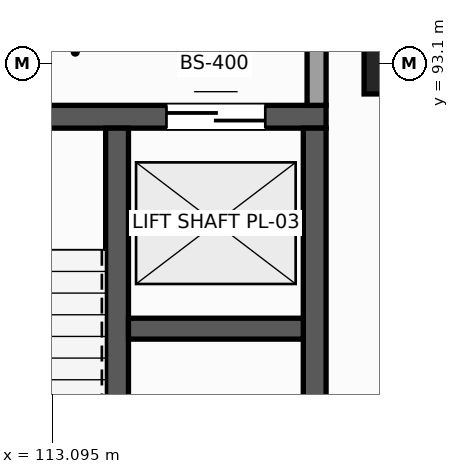
"""IFC4 building model, lengths in metres.
Left out: names, types, materials, properties, quantities, classifications, styles, units other than length and angle.
Written with IfcOpenShell. Run it as: python <this file> out.ifc"""

import sys

from ifc_helpers import new_model, si_unit, direction, frame, frame_2d, origin, origin_2d, place, context, subcontext, project, spatial, rectangle, extrude, element, fill, save


model = new_model("IFC4")
c1 = context("Model", 3, precision=1e-05, world=origin(), true_north=direction((0.0, 1.0)))
c2 = subcontext(c1, "Body", "Model", "MODEL_VIEW")
j1 = project(units=[si_unit("LENGTHUNIT", "METRE"), si_unit("PLANEANGLEUNIT", "RADIAN")], contexts=[c1])
p1 = place(None, origin())
s1 = spatial("IfcSite", under=j1, at=p1, CompositionType="ELEMENT")
p2 = place(p1, origin())
s2 = spatial("IfcBuilding", under=s1, at=p2, CompositionType="ELEMENT")
p3 = place(p2, frame((0.0, 0.0, -5.4)))
s3 = spatial("IfcBuildingStorey", under=s2, at=p3, CompositionType="ELEMENT", Elevation=-5.4)
p4 = place(p3, frame((117.6, 93.1, -0.4), z_axis=(0.0, 0.0, 1.0), x_axis=(1.0, 0.0, 0.0)))
e1 = element("IfcColumn", 1, at=p4, inside=s3, PredefinedType="COLUMN", context=c2, shape_type="SweptSolid", body=[
    extrude(rectangle(XDim=0.8, YDim=0.8, at=origin_2d()), origin(), (0.0, 0.0, 1.0), 5.8),
])
p5 = place(p3, frame((110.1, 92.4, 0.0), z_axis=(0.0, 0.0, 1.0), x_axis=(1.0, 0.0, 0.0)))
e2 = element("IfcWall", 2, at=p5, inside=s3, PredefinedType="SHEAR", context=c2, shape_type="SweptSolid", body=[
    extrude(rectangle(XDim=6.6, YDim=0.3, at=frame_2d((3.3, 0.0))), origin(), (0.0, 0.0, 1.0), 5.08),
])
p6 = place(p5, frame((1.425, 0.0, 0.0)))
e3 = element("IfcOpeningElement", 3, at=p6, cuts=e2, PredefinedType="OPENING", context=c2, shape_type="SweptSolid", body=[
    extrude(rectangle(XDim=1.15, YDim=2.2, at=frame_2d((0.575, 1.1))), frame((0.0, 0.16, 0.0), z_axis=(0.0, -1.0, 0.0), x_axis=(1.0, 0.0, 0.0)), (0.0, 0.0, 1.0), 0.32),
])
p7 = place(p5, frame((4.5, 0.0, 0.0)))
e4 = element("IfcOpeningElement", 4, at=p7, cuts=e2, PredefinedType="OPENING", context=c2, shape_type="SweptSolid", body=[
    extrude(rectangle(XDim=1.3, YDim=2.2, at=frame_2d((0.65, 1.1))), frame((0.0, 0.16, 0.0), z_axis=(0.0, -1.0, 0.0), x_axis=(1.0, 0.0, 0.0)), (0.0, 0.0, 1.0), 0.32),
])
for number, where, z_axis, x_axis in (
    (5, (116.55, 84.85, 0.0), (0.0, 0.0, 1.0), (0.0, 1.0, 0.0)),
    (6, (113.95, 84.85, 0.0), (0.0, 0.0, 1.0), (0.0, 1.0, 0.0)),
):
    element("IfcWall", number, at=place(p3, frame(where, z_axis=z_axis, x_axis=x_axis)), inside=s3, PredefinedType="SHEAR", context=c2, shape_type="SweptSolid", body=[
        extrude(rectangle(XDim=7.4, YDim=0.3, at=frame_2d((3.7, 0.0))), origin(), (0.0, 0.0, 1.0), 5.08),
    ])
p8 = place(p3, frame((114.1, 89.612, 0.0), z_axis=(0.0, 0.0, 1.0), x_axis=(1.0, 0.0, 0.0)))
e7 = element("IfcWall", 7, at=p8, inside=s3, PredefinedType="SHEAR", context=c2, shape_type="SweptSolid", body=[
    extrude(rectangle(XDim=2.3, YDim=0.275, at=frame_2d((1.15, 0.0))), origin(), (0.0, 0.0, 1.0), 5.08),
])
p9 = place(p3, frame((116.575, 92.55, 0.0), z_axis=(0.0, 0.0, 1.0), x_axis=(0.0, 1.0, 0.0)))
e8 = element("IfcWall", 8, at=p9, inside=s3, PredefinedType="PARTITIONING", context=c2, shape_type="SweptSolid", body=[
    extrude(rectangle(XDim=2.95, YDim=0.25, at=frame_2d((1.475, 0.0))), origin(), (0.0, 0.0, 1.0), 4.23),
])
p10 = place(p7, origin())
e9 = element("IfcDoor", 9, at=p10, inside=s3, OperationType="DOUBLE_DOOR_SLIDING", PredefinedType="DOOR", context=c2, shape_type="SweptSolid", body=[
    extrude(rectangle(XDim=1.3, YDim=2.2, at=frame_2d((0.65, 1.1))), frame((0.0, 0.025, 0.0), z_axis=(0.0, -1.0, 0.0), x_axis=(1.0, 0.0, 0.0)), (0.0, 0.0, 1.0), 0.05),
])
fill(e4, e9)
save(model, sys.argv[1])
